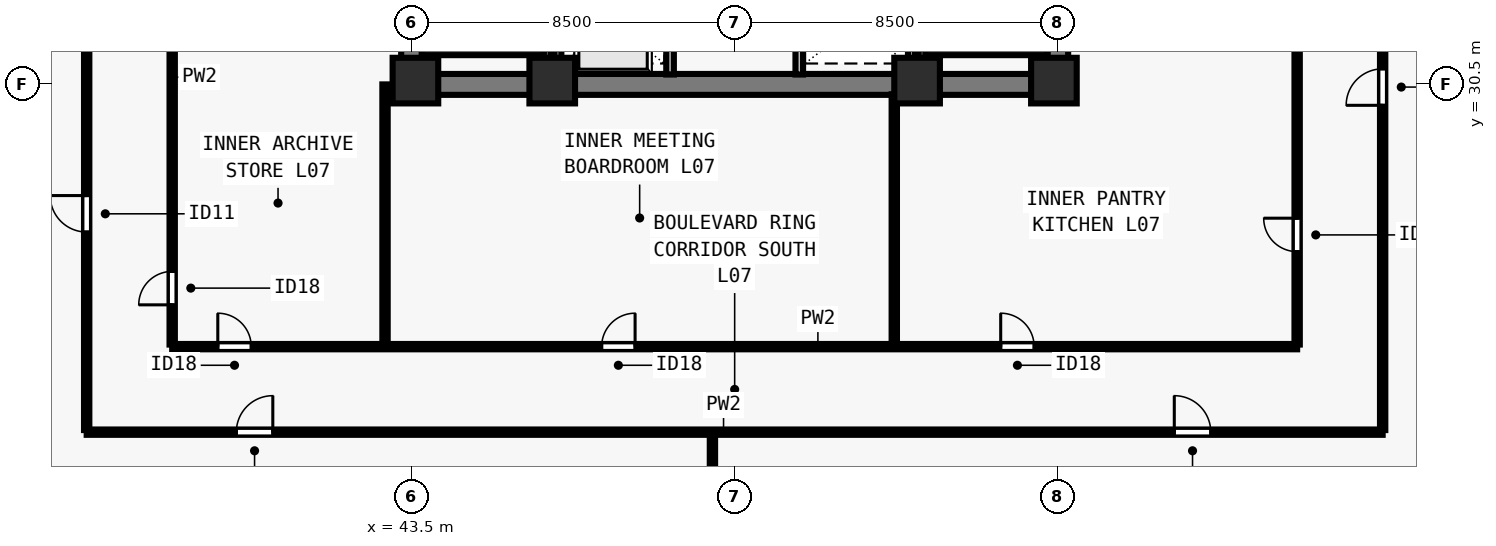
"""IFC4 building model, lengths in metres.
Left out: names, types, materials, properties, quantities, classifications, styles, units other than length and angle.
Written with IfcOpenShell. Run it as: python <this file> out.ifc"""

import sys

from ifc_helpers import new_model, si_unit, direction, frame, frame_2d, origin, origin_2d, place, context, subcontext, project, spatial, rectangle, extrude, element, fill, save


model = new_model("IFC4")
c1 = context("Model", 3, precision=1e-05, world=origin(), true_north=direction((0.0, 1.0)))
c2 = subcontext(c1, "Body", "Model", "MODEL_VIEW")
j1 = project(units=[si_unit("LENGTHUNIT", "METRE"), si_unit("PLANEANGLEUNIT", "RADIAN")], contexts=[c1])
p1 = place(None, origin())
s1 = spatial("IfcSite", under=j1, at=p1, CompositionType="ELEMENT")
p2 = place(p1, origin())
s2 = spatial("IfcBuilding", under=s1, at=p2, CompositionType="ELEMENT")
p3 = place(p2, frame((0.0, 0.0, 30.5)))
s3 = spatial("IfcBuildingStorey", under=s2, at=p3, CompositionType="ELEMENT", Elevation=30.5)
for number, where, z_axis, x_axis in (
    (1, (43.6, 30.6, 0.0), (0.0, 0.0, 1.0), (1.0, 0.0, 0.0)),
    (2, (47.2, 30.6, 0.0), (0.0, 0.0, 1.0), (1.0, 0.0, 0.0)),
    (3, (56.8, 30.6, 0.0), (0.0, 0.0, 1.0), (1.0, 0.0, 0.0)),
    (4, (60.4, 30.6, 0.0), (0.0, 0.0, 1.0), (1.0, 0.0, 0.0)),
):
    element("IfcColumn", number, at=place(p3, frame(where, z_axis=z_axis, x_axis=x_axis)), inside=s3, PredefinedType="COLUMN", context=c2, shape_type="SweptSolid", body=[
        extrude(rectangle(XDim=1.2, YDim=1.2, at=origin_2d()), origin(), (0.0, 0.0, 1.0), 3.5),
    ])
p4 = place(p3, frame((43.225, 30.5, 0.0), z_axis=(0.0, 0.0, 1.0), x_axis=(1.0, 0.0, 0.0)))
e5 = element("IfcWall", 5, at=p4, inside=s3, PredefinedType="SHEAR", context=c2, shape_type="SweptSolid", body=[
    extrude(rectangle(XDim=17.55, YDim=0.55, at=frame_2d((8.775, 0.0))), origin(), (0.0, 0.0, 1.0), 3.28),
])
for number, where, z_axis, x_axis in (
    (6, (43.5, 30.765, 0.0), (0.0, 0.0, 1.0), (0.0, 1.0, 0.0)),
    (7, (60.5, 30.765, 0.0), (0.0, 0.0, 1.0), (0.0, 1.0, 0.0)),
):
    element("IfcWall", number, at=place(p3, frame(where, z_axis=z_axis, x_axis=x_axis)), inside=s3, PredefinedType="SHEAR", context=c2, shape_type="SweptSolid", body=[
        extrude(rectangle(XDim=7.985, YDim=0.55, at=frame_2d((3.993, 0.0))), origin(), (0.0, 0.0, 1.0), 3.28),
    ])
p5 = place(p3, frame((50.3, 30.76, 0.0), z_axis=(0.0, 0.0, 1.0), x_axis=(0.0, 1.0, 0.0)))
e8 = element("IfcWall", 8, at=p5, inside=s3, PredefinedType="SOLIDWALL", context=c2, shape_type="SweptSolid", body=[
    extrude(rectangle(XDim=7.855, YDim=0.2, at=frame_2d((3.927, 0.0))), origin(), (0.0, 0.0, 1.0), 3.28),
])
p6 = place(p5, frame((0.79, 0.0, 0.0)))
e9 = element("IfcOpeningElement", 9, at=p6, cuts=e8, PredefinedType="OPENING", context=c2, shape_type="SweptSolid", body=[
    extrude(rectangle(XDim=1.1, YDim=2.2, at=frame_2d((0.55, 1.1))), frame((0.0, 0.11, 0.0), z_axis=(0.0, -1.0, 0.0), x_axis=(1.0, 0.0, 0.0)), (0.0, 0.0, 1.0), 0.22),
])
p7 = place(p5, frame((3.49, 0.0, 0.0)))
e10 = element("IfcOpeningElement", 10, at=p7, cuts=e8, PredefinedType="OPENING", context=c2, shape_type="SweptSolid", body=[
    extrude(rectangle(XDim=1.1, YDim=2.2, at=frame_2d((0.55, 1.1))), frame((0.0, 0.11, 0.0), z_axis=(0.0, -1.0, 0.0), x_axis=(1.0, 0.0, 0.0)), (0.0, 0.0, 1.0), 0.22),
])
p8 = place(p5, frame((6.19, 0.0, 0.0)))
e11 = element("IfcOpeningElement", 11, at=p8, cuts=e8, PredefinedType="OPENING", context=c2, shape_type="SweptSolid", body=[
    extrude(rectangle(XDim=1.1, YDim=2.2, at=frame_2d((0.55, 1.1))), frame((0.0, 0.11, 0.0), z_axis=(0.0, -1.0, 0.0), x_axis=(1.0, 0.0, 0.0)), (0.0, 0.0, 1.0), 0.22),
])
p9 = place(p3, frame((53.7, 30.76, 0.0), z_axis=(0.0, 0.0, 1.0), x_axis=(0.0, 1.0, 0.0)))
e12 = element("IfcWall", 12, at=p9, inside=s3, PredefinedType="SOLIDWALL", context=c2, shape_type="SweptSolid", body=[
    extrude(rectangle(XDim=7.855, YDim=0.2, at=frame_2d((3.927, 0.0))), origin(), (0.0, 0.0, 1.0), 3.28),
])
for number, where, z_axis, x_axis in (
    (13, (47.35, 30.76, 0.0), (0.0, 0.0, 1.0), (0.0, 1.0, 0.0)),
    (14, (56.65, 30.76, 0.0), (0.0, 0.0, 1.0), (0.0, 1.0, 0.0)),
):
    element("IfcWall", number, at=place(p3, frame(where, z_axis=z_axis, x_axis=x_axis)), inside=s3, PredefinedType="SOLIDWALL", context=c2, shape_type="SweptSolid", body=[
        extrude(rectangle(XDim=7.855, YDim=0.18, at=frame_2d((3.927, 0.0))), origin(), (0.0, 0.0, 1.0), 3.28),
    ])
p10 = place(p3, frame((34.95, 21.35, 0.0), z_axis=(0.0, 0.0, 1.0), x_axis=(1.0, 0.0, 0.0)))
e15 = element("IfcWall", 15, at=p10, inside=s3, PredefinedType="PARTITIONING", context=c2, shape_type="SweptSolid", body=[
    extrude(rectangle(XDim=34.1, YDim=0.14, at=frame_2d((17.05, 0.0))), origin(), (0.0, 0.0, 1.0), 3.28),
])
p11 = place(p10, frame((3.938, 0.0, 0.0)))
e16 = element("IfcOpeningElement", 16, at=p11, cuts=e15, PredefinedType="OPENING", context=c2, shape_type="SweptSolid", body=[
    extrude(rectangle(XDim=0.96, YDim=2.12, at=frame_2d((0.48, 1.06))), frame((0.0, 0.08, 0.0), z_axis=(0.0, -1.0, 0.0), x_axis=(1.0, 0.0, 0.0)), (0.0, 0.0, 1.0), 0.16),
])
p12 = place(p10, frame((28.617, 0.0, 0.0)))
e17 = element("IfcOpeningElement", 17, at=p12, cuts=e15, PredefinedType="OPENING", context=c2, shape_type="SweptSolid", body=[
    extrude(rectangle(XDim=0.96, YDim=2.12, at=frame_2d((0.48, 1.06))), frame((0.0, 0.08, 0.0), z_axis=(0.0, -1.0, 0.0), x_axis=(1.0, 0.0, 0.0)), (0.0, 0.0, 1.0), 0.16),
])
p13 = place(p3, frame((34.95, 21.405, 0.0), z_axis=(0.0, 0.0, 1.0), x_axis=(0.0, 1.0, 0.0)))
e18 = element("IfcWall", 18, at=p13, inside=s3, PredefinedType="PARTITIONING", context=c2, shape_type="SweptSolid", body=[
    extrude(rectangle(XDim=35.19, YDim=0.14, at=frame_2d((17.595, 0.0))), origin(), (0.0, 0.0, 1.0), 3.28),
])
p14 = place(p13, frame((5.21, 0.0, 0.0)))
e19 = element("IfcOpeningElement", 19, at=p14, cuts=e18, PredefinedType="OPENING", context=c2, shape_type="SweptSolid", body=[
    extrude(rectangle(XDim=0.96, YDim=2.12, at=frame_2d((0.48, 1.06))), frame((0.0, 0.08, 0.0), z_axis=(0.0, -1.0, 0.0), x_axis=(1.0, 0.0, 0.0)), (0.0, 0.0, 1.0), 0.16),
])
p15 = place(p13, frame((17.052, 0.0, 0.0)))
e20 = element("IfcOpeningElement", 20, at=p15, cuts=e18, PredefinedType="OPENING", context=c2, shape_type="SweptSolid", body=[
    extrude(rectangle(XDim=0.96, YDim=2.12, at=frame_2d((0.48, 1.06))), frame((0.0, 0.08, 0.0), z_axis=(0.0, -1.0, 0.0), x_axis=(1.0, 0.0, 0.0)), (0.0, 0.0, 1.0), 0.16),
])
p16 = place(p13, frame((28.957, 0.0, 0.0)))
e21 = element("IfcOpeningElement", 21, at=p16, cuts=e18, PredefinedType="OPENING", context=c2, shape_type="SweptSolid", body=[
    extrude(rectangle(XDim=0.96, YDim=2.12, at=frame_2d((0.48, 1.06))), frame((0.0, 0.08, 0.0), z_axis=(0.0, -1.0, 0.0), x_axis=(1.0, 0.0, 0.0)), (0.0, 0.0, 1.0), 0.16),
])
p17 = place(p3, frame((69.05, 21.405, 0.0), z_axis=(0.0, 0.0, 1.0), x_axis=(0.0, 1.0, 0.0)))
e22 = element("IfcWall", 22, at=p17, inside=s3, PredefinedType="PARTITIONING", context=c2, shape_type="SweptSolid", body=[
    extrude(rectangle(XDim=35.19, YDim=0.14, at=frame_2d((17.595, 0.0))), origin(), (0.0, 0.0, 1.0), 3.28),
])
p18 = place(p17, frame((8.545, 0.0, 0.0)))
e23 = element("IfcOpeningElement", 23, at=p18, cuts=e22, PredefinedType="OPENING", context=c2, shape_type="SweptSolid", body=[
    extrude(rectangle(XDim=0.96, YDim=2.12, at=frame_2d((0.48, 1.06))), frame((0.0, 0.08, 0.0), z_axis=(0.0, -1.0, 0.0), x_axis=(1.0, 0.0, 0.0)), (0.0, 0.0, 1.0), 0.16),
])
p19 = place(p17, frame((26.095, 0.0, 0.0)))
e24 = element("IfcOpeningElement", 24, at=p19, cuts=e22, PredefinedType="OPENING", context=c2, shape_type="SweptSolid", body=[
    extrude(rectangle(XDim=0.96, YDim=2.12, at=frame_2d((0.48, 1.06))), frame((0.0, 0.08, 0.0), z_axis=(0.0, -1.0, 0.0), x_axis=(1.0, 0.0, 0.0)), (0.0, 0.0, 1.0), 0.16),
])
p20 = place(p3, frame((37.2, 23.6, 0.0), z_axis=(0.0, 0.0, 1.0), x_axis=(1.0, 0.0, 0.0)))
e25 = element("IfcWall", 25, at=p20, inside=s3, PredefinedType="PARTITIONING", context=c2, shape_type="SweptSolid", body=[
    extrude(rectangle(XDim=29.6, YDim=0.14, at=frame_2d((14.8, 0.0))), origin(), (0.0, 0.0, 1.0), 3.28),
])
p21 = place(p20, frame((1.2, 0.0, 0.0)))
e26 = element("IfcOpeningElement", 26, at=p21, cuts=e25, PredefinedType="OPENING", context=c2, shape_type="SweptSolid", body=[
    extrude(rectangle(XDim=0.88, YDim=2.1, at=frame_2d((0.44, 1.05))), frame((0.0, 0.08, 0.0), z_axis=(0.0, -1.0, 0.0), x_axis=(1.0, 0.0, 0.0)), (0.0, 0.0, 1.0), 0.16),
])
p22 = place(p20, frame((11.3, 0.0, 0.0)))
e27 = element("IfcOpeningElement", 27, at=p22, cuts=e25, PredefinedType="OPENING", context=c2, shape_type="SweptSolid", body=[
    extrude(rectangle(XDim=0.88, YDim=2.1, at=frame_2d((0.44, 1.05))), frame((0.0, 0.08, 0.0), z_axis=(0.0, -1.0, 0.0), x_axis=(1.0, 0.0, 0.0)), (0.0, 0.0, 1.0), 0.16),
])
p23 = place(p20, frame((21.8, 0.0, 0.0)))
e28 = element("IfcOpeningElement", 28, at=p23, cuts=e25, PredefinedType="OPENING", context=c2, shape_type="SweptSolid", body=[
    extrude(rectangle(XDim=0.88, YDim=2.1, at=frame_2d((0.44, 1.05))), frame((0.0, 0.08, 0.0), z_axis=(0.0, -1.0, 0.0), x_axis=(1.0, 0.0, 0.0)), (0.0, 0.0, 1.0), 0.16),
])
p24 = place(p3, frame((37.2, 23.655, 0.0), z_axis=(0.0, 0.0, 1.0), x_axis=(0.0, 1.0, 0.0)))
e29 = element("IfcWall", 29, at=p24, inside=s3, PredefinedType="PARTITIONING", context=c2, shape_type="SweptSolid", body=[
    extrude(rectangle(XDim=15.095, YDim=0.14, at=frame_2d((7.547, 0.0))), origin(), (0.0, 0.0, 1.0), 3.28),
])
p25 = place(p24, frame((1.045, 0.0, 0.0)))
e30 = element("IfcOpeningElement", 30, at=p25, cuts=e29, PredefinedType="OPENING", context=c2, shape_type="SweptSolid", body=[
    extrude(rectangle(XDim=0.88, YDim=2.1, at=frame_2d((0.44, 1.05))), frame((0.0, 0.08, 0.0), z_axis=(0.0, -1.0, 0.0), x_axis=(1.0, 0.0, 0.0)), (0.0, 0.0, 1.0), 0.16),
])
p26 = place(p24, frame((12.145, 0.0, 0.0)))
e31 = element("IfcOpeningElement", 31, at=p26, cuts=e29, PredefinedType="OPENING", context=c2, shape_type="SweptSolid", body=[
    extrude(rectangle(XDim=0.88, YDim=2.1, at=frame_2d((0.44, 1.05))), frame((0.0, 0.08, 0.0), z_axis=(0.0, -1.0, 0.0), x_axis=(1.0, 0.0, 0.0)), (0.0, 0.0, 1.0), 0.16),
])
p27 = place(p3, frame((66.8, 23.655, 0.0), z_axis=(0.0, 0.0, 1.0), x_axis=(0.0, 1.0, 0.0)))
e32 = element("IfcWall", 32, at=p27, inside=s3, PredefinedType="PARTITIONING", context=c2, shape_type="SweptSolid", body=[
    extrude(rectangle(XDim=15.095, YDim=0.14, at=frame_2d((7.547, 0.0))), origin(), (0.0, 0.0, 1.0), 3.28),
])
p28 = place(p27, frame((2.445, 0.0, 0.0)))
e33 = element("IfcOpeningElement", 33, at=p28, cuts=e32, PredefinedType="OPENING", context=c2, shape_type="SweptSolid", body=[
    extrude(rectangle(XDim=0.88, YDim=2.1, at=frame_2d((0.44, 1.05))), frame((0.0, 0.08, 0.0), z_axis=(0.0, -1.0, 0.0), x_axis=(1.0, 0.0, 0.0)), (0.0, 0.0, 1.0), 0.16),
])
p29 = place(p3, frame((42.8, 23.655, 0.0), z_axis=(0.0, 0.0, 1.0), x_axis=(0.0, 1.0, 0.0)))
e34 = element("IfcWall", 34, at=p29, inside=s3, PredefinedType="PARTITIONING", context=c2, shape_type="SweptSolid", body=[
    extrude(rectangle(XDim=6.845, YDim=0.14, at=frame_2d((3.422, 0.0))), origin(), (0.0, 0.0, 1.0), 2.439),
])
p30 = place(p3, frame((56.2, 23.655, 0.0), z_axis=(0.0, 0.0, 1.0), x_axis=(0.0, 1.0, 0.0)))
e35 = element("IfcWall", 35, at=p30, inside=s3, PredefinedType="PARTITIONING", context=c2, shape_type="SweptSolid", body=[
    extrude(rectangle(XDim=6.585, YDim=0.14, at=frame_2d((3.292, 0.0))), origin(), (0.0, 0.0, 1.0), 2.849),
])
p31 = place(p3, frame((51.415, 13.92, 0.0), z_axis=(0.0, 0.0, 1.0), x_axis=(0.0, 1.0, 0.0)))
e36 = element("IfcWall", 36, at=p31, inside=s3, PredefinedType="PARTITIONING", context=c2, shape_type="SweptSolid", body=[
    extrude(rectangle(XDim=7.33, YDim=0.14, at=frame_2d((3.665, 0.0))), origin(), (0.0, 0.0, 1.0), 2.849),
])
p32 = place(p3, frame((43.765, 31.36, 0.0), z_axis=(0.0, 0.0, 1.0), x_axis=(1.0, 0.0, 0.0)))
e37 = element("IfcWall", 37, at=p32, inside=s3, PredefinedType="SOLIDWALL", context=c2, shape_type="SweptSolid", body=[
    extrude(rectangle(XDim=3.23, YDim=0.18, at=frame_2d((1.615, 0.0))), origin(), (0.0, 0.0, 1.0), 3.28),
])
p33 = place(p3, frame((47.07, 38.78, 0.0), z_axis=(0.0, 0.0, 1.0), x_axis=(0.0, -1.0, 0.0)))
e38 = element("IfcWall", 38, at=p33, inside=s3, PredefinedType="SOLIDWALL", context=c2, shape_type="SweptSolid", body=[
    extrude(rectangle(XDim=8.017, YDim=0.18, at=frame_2d((4.009, 0.0))), origin(), (0.0, 0.0, 1.0), 3.28),
])
p34 = place(p3, frame((57.005, 31.36, 0.0), z_axis=(0.0, 0.0, 1.0), x_axis=(1.0, 0.0, 0.0)))
e39 = element("IfcWall", 39, at=p34, inside=s3, PredefinedType="SOLIDWALL", context=c2, shape_type="SweptSolid", body=[
    extrude(rectangle(XDim=3.23, YDim=0.18, at=frame_2d((1.615, 0.0))), origin(), (0.0, 0.0, 1.0), 3.28),
])
p35 = place(p3, frame((56.93, 38.78, 0.0), z_axis=(0.0, 0.0, 1.0), x_axis=(0.0, -1.0, 0.0)))
e40 = element("IfcWall", 40, at=p35, inside=s3, PredefinedType="SOLIDWALL", context=c2, shape_type="SweptSolid", body=[
    extrude(rectangle(XDim=8.017, YDim=0.18, at=frame_2d((4.009, 0.0))), origin(), (0.0, 0.0, 1.0), 3.28),
])
p36 = place(p21, origin())
e41 = element("IfcDoor", 41, at=p36, inside=s3, OperationType="SINGLE_SWING_LEFT", PredefinedType="DOOR", context=c2, shape_type="SweptSolid", body=[
    extrude(rectangle(XDim=0.88, YDim=2.1, at=frame_2d((0.44, 1.05))), frame((0.0, 0.025, 0.0), z_axis=(0.0, -1.0, 0.0), x_axis=(1.0, 0.0, 0.0)), (0.0, 0.0, 1.0), 0.05),
])
fill(e26, e41)
p37 = place(p22, origin())
e42 = element("IfcDoor", 42, at=p37, inside=s3, OperationType="SINGLE_SWING_RIGHT", PredefinedType="DOOR", context=c2, shape_type="SweptSolid", body=[
    extrude(rectangle(XDim=0.88, YDim=2.1, at=frame_2d((0.44, 1.05))), frame((0.0, 0.025, 0.0), z_axis=(0.0, -1.0, 0.0), x_axis=(1.0, 0.0, 0.0)), (0.0, 0.0, 1.0), 0.05),
])
fill(e27, e42)
p38 = place(p23, origin())
e43 = element("IfcDoor", 43, at=p38, inside=s3, OperationType="SINGLE_SWING_LEFT", PredefinedType="DOOR", context=c2, shape_type="SweptSolid", body=[
    extrude(rectangle(XDim=0.88, YDim=2.1, at=frame_2d((0.44, 1.05))), frame((0.0, 0.025, 0.0), z_axis=(0.0, -1.0, 0.0), x_axis=(1.0, 0.0, 0.0)), (0.0, 0.0, 1.0), 0.05),
])
fill(e28, e43)
p39 = place(p25, origin())
e44 = element("IfcDoor", 44, at=p39, inside=s3, OperationType="SINGLE_SWING_LEFT", PredefinedType="DOOR", context=c2, shape_type="SweptSolid", body=[
    extrude(rectangle(XDim=0.88, YDim=2.1, at=frame_2d((0.44, 1.05))), frame((0.0, 0.025, 0.0), z_axis=(0.0, -1.0, 0.0), x_axis=(1.0, 0.0, 0.0)), (0.0, 0.0, 1.0), 0.05),
])
fill(e30, e44)
p40 = place(p28, origin())
e45 = element("IfcDoor", 45, at=p40, inside=s3, OperationType="SINGLE_SWING_RIGHT", PredefinedType="DOOR", context=c2, shape_type="SweptSolid", body=[
    extrude(rectangle(XDim=0.88, YDim=2.1, at=frame_2d((0.44, 1.05))), frame((0.0, 0.025, 0.0), z_axis=(0.0, -1.0, 0.0), x_axis=(1.0, 0.0, 0.0)), (0.0, 0.0, 1.0), 0.05),
])
fill(e33, e45)
p41 = place(p11, origin())
e46 = element("IfcDoor", 46, at=p41, inside=s3, OperationType="SINGLE_SWING_RIGHT", PredefinedType="DOOR", context=c2, shape_type="SweptSolid", body=[
    extrude(rectangle(XDim=0.96, YDim=2.12, at=frame_2d((0.48, 1.06))), frame((0.0, 0.025, 0.0), z_axis=(0.0, -1.0, 0.0), x_axis=(1.0, 0.0, 0.0)), (0.0, 0.0, 1.0), 0.05),
])
fill(e16, e46)
p42 = place(p12, origin())
e47 = element("IfcDoor", 47, at=p42, inside=s3, OperationType="SINGLE_SWING_LEFT", PredefinedType="DOOR", context=c2, shape_type="SweptSolid", body=[
    extrude(rectangle(XDim=0.96, YDim=2.12, at=frame_2d((0.48, 1.06))), frame((0.0, 0.025, 0.0), z_axis=(0.0, -1.0, 0.0), x_axis=(1.0, 0.0, 0.0)), (0.0, 0.0, 1.0), 0.05),
])
fill(e17, e47)
p43 = place(p14, origin())
e48 = element("IfcDoor", 48, at=p43, inside=s3, OperationType="SINGLE_SWING_RIGHT", PredefinedType="DOOR", context=c2, shape_type="SweptSolid", body=[
    extrude(rectangle(XDim=0.96, YDim=2.12, at=frame_2d((0.48, 1.06))), frame((0.0, 0.025, 0.0), z_axis=(0.0, -1.0, 0.0), x_axis=(1.0, 0.0, 0.0)), (0.0, 0.0, 1.0), 0.05),
])
fill(e19, e48)
p44 = place(p18, origin())
e49 = element("IfcDoor", 49, at=p44, inside=s3, OperationType="SINGLE_SWING_LEFT", PredefinedType="DOOR", context=c2, shape_type="SweptSolid", body=[
    extrude(rectangle(XDim=0.96, YDim=2.12, at=frame_2d((0.48, 1.06))), frame((0.0, 0.025, 0.0), z_axis=(0.0, -1.0, 0.0), x_axis=(1.0, 0.0, 0.0)), (0.0, 0.0, 1.0), 0.05),
])
fill(e23, e49)
save(model, sys.argv[1])
